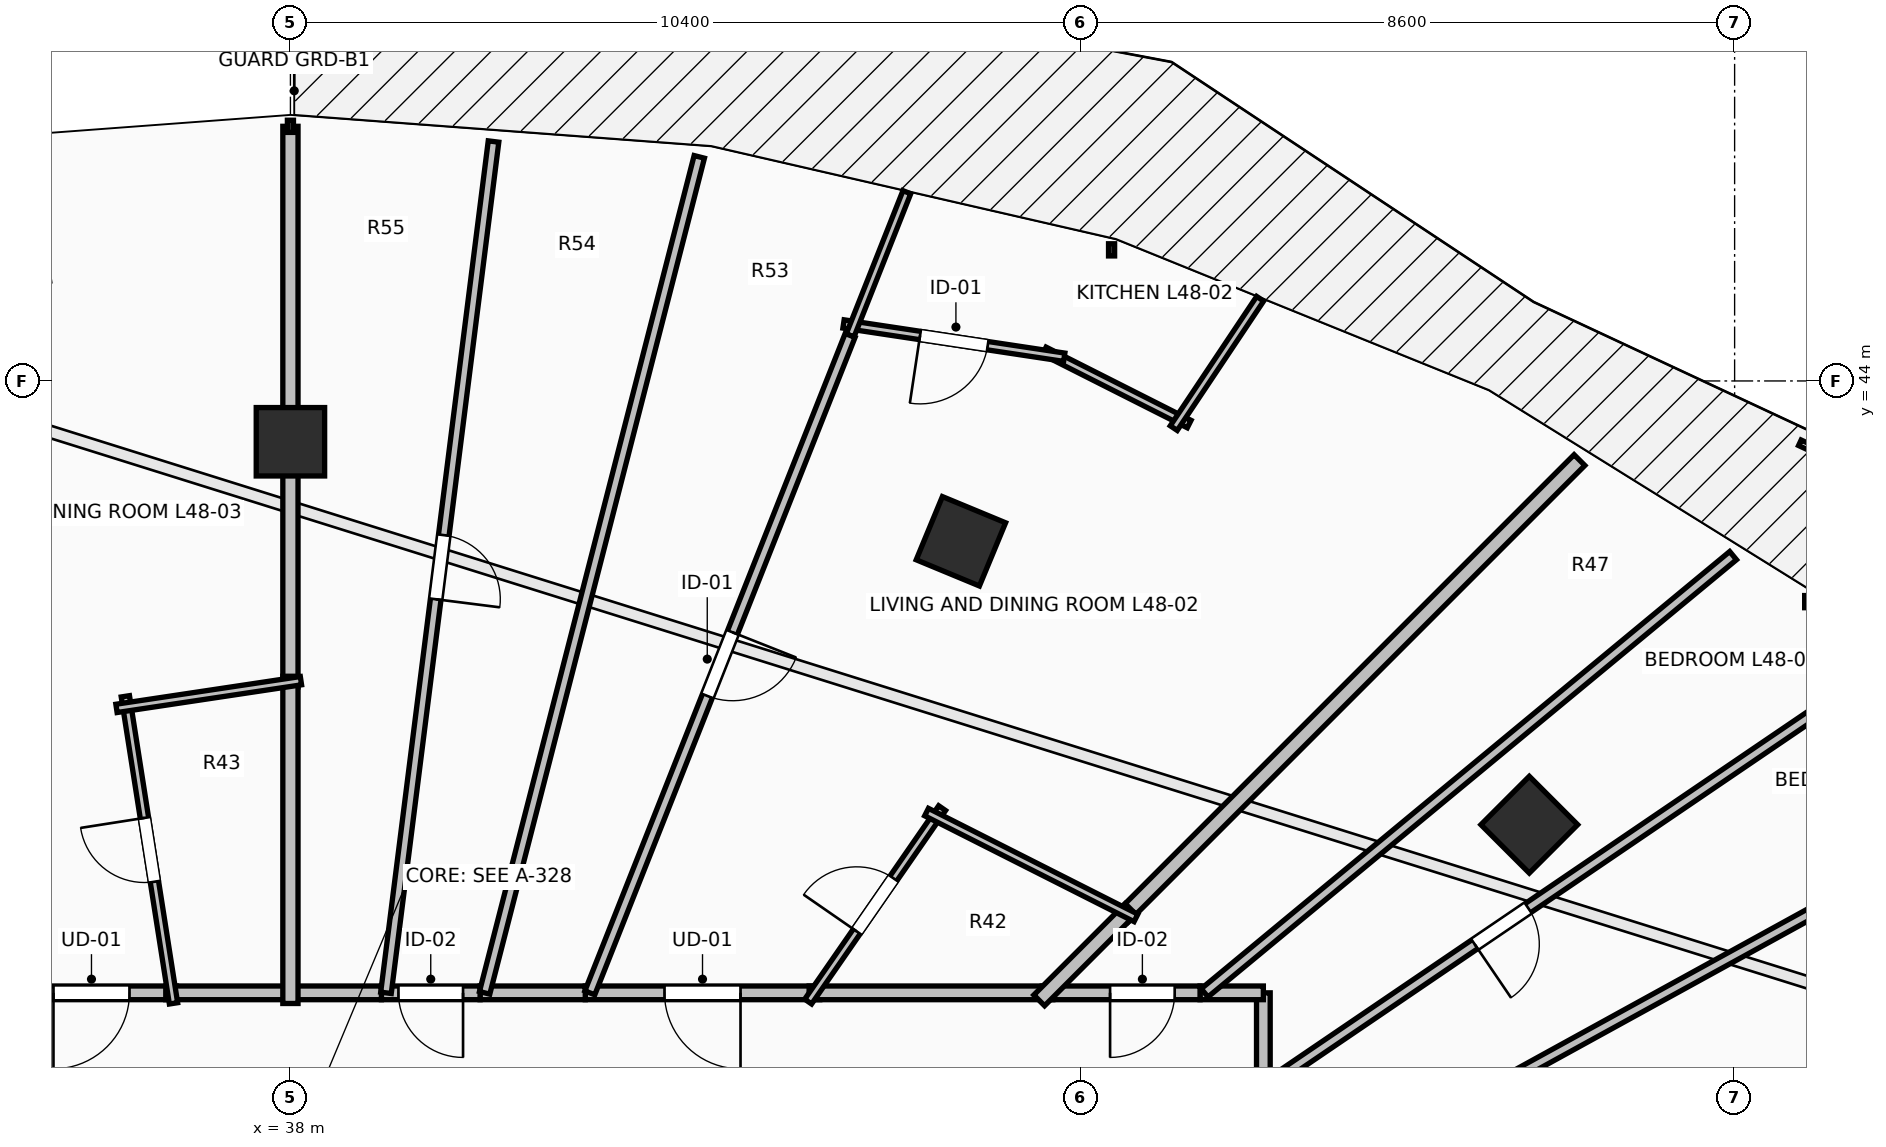
"""IFC4 building model, lengths in metres.
Left out: names, types, materials, properties, quantities, classifications, styles, units other than length and angle.
Written with IfcOpenShell. Run it as: python <this file> out.ifc"""

import sys

from ifc_helpers import new_model, si_unit, direction, frame, frame_2d, origin, origin_2d, place, context, subcontext, project, spatial, rectangle, extrude, element, fill, save


model = new_model("IFC4")
c1 = context("Model", 3, precision=1e-05, world=origin(), true_north=direction((0.0, 1.0)))
c2 = subcontext(c1, "Body", "Model", "MODEL_VIEW")
j1 = project(units=[si_unit("LENGTHUNIT", "METRE"), si_unit("PLANEANGLEUNIT", "RADIAN")], contexts=[c1])
p1 = place(None, origin())
s1 = spatial("IfcSite", under=j1, at=p1, CompositionType="ELEMENT")
p2 = place(p1, origin())
s2 = spatial("IfcBuilding", under=s1, at=p2, CompositionType="ELEMENT")
p3 = place(p2, frame((0.0, 0.0, 179.1)))
s3 = spatial("IfcBuildingStorey", under=s2, at=p3, CompositionType="ELEMENT", Elevation=179.1)
for number, where, z_axis, x_axis in (
    (1, (54.299, 38.162, 0.0), (0.0, 0.0, 1.0), (0.707, 0.707, 0.0)),
    (2, (46.821, 41.891, 0.0), (0.0, 0.0, 1.0), (0.383, 0.924, 0.0)),
    (3, (38.0, 43.2, 0.0), (0.0, 0.0, 1.0), (0.0, 1.0, 0.0)),
):
    element("IfcColumn", number, at=place(p3, frame(where, z_axis=z_axis, x_axis=x_axis)), inside=s3, PredefinedType="COLUMN", context=c2, shape_type="SweptSolid", body=[
        extrude(rectangle(XDim=0.9, YDim=0.9, at=origin_2d()), origin(), (0.0, 0.0, 1.0), 3.5),
    ])
p4 = place(p3, frame((50.8, 34.772, 0.0), z_axis=(0.0, 0.0, 1.0), x_axis=(0.0, 1.0, 0.0)))
e4 = element("IfcWall", 4, at=p4, inside=s3, PredefinedType="PARTITIONING", context=c2, shape_type="SweptSolid", body=[
    extrude(rectangle(XDim=1.178, YDim=0.18, at=frame_2d((0.589, 0.0))), origin(), (0.0, 0.0, 1.0), 2.432),
])
p5 = place(p3, frame((50.8, 35.95, 0.0), z_axis=(0.0, 0.0, 1.0), x_axis=(-1.0, 0.0, 0.0)))
e5 = element("IfcWall", 5, at=p5, inside=s3, PredefinedType="PARTITIONING", context=c2, shape_type="SweptSolid", body=[
    extrude(rectangle(XDim=0.833, YDim=0.18, at=frame_2d((0.417, 0.0))), origin(), (0.0, 0.0, 1.0), 3.24),
])
p6 = place(p3, frame((49.967, 35.95, 0.0), z_axis=(0.0, 0.0, 1.0), x_axis=(-1.0, 0.0, 0.0)))
e6 = element("IfcWall", 6, at=p6, inside=s3, PredefinedType="PARTITIONING", context=c2, shape_type="SweptSolid", body=[
    extrude(rectangle(XDim=2.077, YDim=0.18, at=frame_2d((1.039, 0.0))), origin(), (0.0, 0.0, 1.0), 2.432),
])
p7 = place(p6, frame((0.333, 0.0, 0.0)))
e7 = element("IfcOpeningElement", 7, at=p7, cuts=e6, PredefinedType="OPENING", context=c2, shape_type="SweptSolid", body=[
    extrude(rectangle(XDim=0.85, YDim=2.1, at=frame_2d((0.425, 1.05))), frame((0.0, 0.105, 0.0), z_axis=(0.0, -1.0, 0.0), x_axis=(1.0, 0.0, 0.0)), (0.0, 0.0, 1.0), 0.21),
])
p8 = place(p3, frame((44.964, 35.95, 0.0), z_axis=(0.0, 0.0, 1.0), x_axis=(-1.0, 0.0, 0.0)))
e8 = element("IfcWall", 8, at=p8, inside=s3, PredefinedType="PARTITIONING", context=c2, shape_type="SweptSolid", body=[
    extrude(rectangle(XDim=3.085, YDim=0.18, at=frame_2d((1.542, 0.0))), origin(), (0.0, 0.0, 1.0), 2.922),
])
p9 = place(p8, frame((1.042, 0.0, 0.0)))
e9 = element("IfcOpeningElement", 9, at=p9, cuts=e8, PredefinedType="OPENING", context=c2, shape_type="SweptSolid", body=[
    extrude(rectangle(XDim=1.0, YDim=2.15, at=frame_2d((0.5, 1.075))), frame((0.0, 0.105, 0.0), z_axis=(0.0, -1.0, 0.0), x_axis=(1.0, 0.0, 0.0)), (0.0, 0.0, 1.0), 0.21),
])
p10 = place(p3, frame((48.03, 35.95, 0.0), z_axis=(0.0, 0.0, 1.0), x_axis=(-1.0, 0.0, 0.0)))
e10 = element("IfcWall", 10, at=p10, inside=s3, PredefinedType="PARTITIONING", context=c2, shape_type="SweptSolid", body=[
    extrude(rectangle(XDim=3.206, YDim=0.18, at=frame_2d((1.603, 0.0))), origin(), (0.0, 0.0, 1.0), 2.432),
])
p11 = place(p3, frame((41.879, 35.95, 0.0), z_axis=(0.0, 0.0, 1.0), x_axis=(-1.0, 0.0, 0.0)))
e11 = element("IfcWall", 11, at=p11, inside=s3, PredefinedType="PARTITIONING", context=c2, shape_type="SweptSolid", body=[
    extrude(rectangle(XDim=1.384, YDim=0.18, at=frame_2d((0.692, 0.0))), origin(), (0.0, 0.0, 1.0), 2.922),
])
p12 = place(p3, frame((40.495, 35.95, 0.0), z_axis=(0.0, 0.0, 1.0), x_axis=(-1.0, 0.0, 0.0)))
e12 = element("IfcWall", 12, at=p12, inside=s3, PredefinedType="PARTITIONING", context=c2, shape_type="SweptSolid", body=[
    extrude(rectangle(XDim=1.298, YDim=0.18, at=frame_2d((0.649, 0.0))), origin(), (0.0, 0.0, 1.0), 2.922),
])
p13 = place(p12, frame((0.224, 0.0, 0.0)))
e13 = element("IfcOpeningElement", 13, at=p13, cuts=e12, PredefinedType="OPENING", context=c2, shape_type="SweptSolid", body=[
    extrude(rectangle(XDim=0.85, YDim=2.1, at=frame_2d((0.425, 1.05))), frame((0.0, 0.105, 0.0), z_axis=(0.0, -1.0, 0.0), x_axis=(1.0, 0.0, 0.0)), (0.0, 0.0, 1.0), 0.21),
])
p14 = place(p3, frame((39.197, 35.95, 0.0), z_axis=(0.0, 0.0, 1.0), x_axis=(-1.0, 0.0, 0.0)))
e14 = element("IfcWall", 14, at=p14, inside=s3, PredefinedType="PARTITIONING", context=c2, shape_type="SweptSolid", body=[
    extrude(rectangle(XDim=1.257, YDim=0.18, at=frame_2d((0.628, 0.0))), origin(), (0.0, 0.0, 1.0), 2.922),
])
p15 = place(p3, frame((36.5, 35.95, 0.0), z_axis=(0.0, 0.0, 1.0), x_axis=(-1.0, 0.0, 0.0)))
e15 = element("IfcWall", 15, at=p15, inside=s3, PredefinedType="PARTITIONING", context=c2, shape_type="SweptSolid", body=[
    extrude(rectangle(XDim=2.235, YDim=0.18, at=frame_2d((1.118, 0.0))), origin(), (0.0, 0.0, 1.0), 2.922),
])
p16 = place(p15, frame((0.617, 0.0, 0.0)))
e16 = element("IfcOpeningElement", 16, at=p16, cuts=e15, PredefinedType="OPENING", context=c2, shape_type="SweptSolid", body=[
    extrude(rectangle(XDim=1.0, YDim=2.15, at=frame_2d((0.5, 1.075))), frame((0.0, 0.105, 0.0), z_axis=(0.0, -1.0, 0.0), x_axis=(1.0, 0.0, 0.0)), (0.0, 0.0, 1.0), 0.21),
])
p17 = place(p3, frame((38.08, 35.95, 0.0), z_axis=(0.0, 0.0, 1.0), x_axis=(-1.0, 0.0, 0.0)))
e17 = element("IfcWall", 17, at=p17, inside=s3, PredefinedType="PARTITIONING", context=c2, shape_type="SweptSolid", body=[
    extrude(rectangle(XDim=1.72, YDim=0.18, at=frame_2d((0.86, 0.0))), origin(), (0.0, 0.0, 1.0), 2.922),
])
p18 = place(p3, frame((60.761, 38.513, 0.0), z_axis=(0.0, 0.0, 1.0), x_axis=(-0.876315654865, -0.481737348602, 0.0)))
e18 = element("IfcWall", 18, at=p18, inside=s3, PredefinedType="PARTITIONING", context=c2, shape_type="SweptSolid", body=[
    extrude(rectangle(XDim=11.367, YDim=0.14, at=frame_2d((5.684, 0.0))), origin(), (0.0, 0.0, 1.0), 2.432),
])
p19 = place(p3, frame((58.917, 40.215, 0.0), z_axis=(0.0, 0.0, 1.0), x_axis=(-0.827087951184, -0.562072522906, 0.0)))
e19 = element("IfcWall", 19, at=p19, inside=s3, PredefinedType="PARTITIONING", context=c2, shape_type="SweptSolid", body=[
    extrude(rectangle(XDim=9.814, YDim=0.14, at=frame_2d((4.907, 0.0))), origin(), (0.0, 0.0, 1.0), 2.432),
])
p20 = place(p19, frame((5.602, 0.0, 0.0)))
e20 = element("IfcOpeningElement", 20, at=p20, cuts=e19, PredefinedType="OPENING", context=c2, shape_type="SweptSolid", body=[
    extrude(rectangle(XDim=0.85, YDim=2.1, at=frame_2d((0.425, 1.05))), frame((0.0, 0.085, 0.0), z_axis=(0.0, -1.0, 0.0), x_axis=(1.0, 0.0, 0.0)), (0.0, 0.0, 1.0), 0.17),
])
p21 = place(p3, frame((56.98, 41.702, 0.0), z_axis=(0.0, 0.0, 1.0), x_axis=(-0.770511618294, -0.637425953405, 0.0)))
e21 = element("IfcWall", 21, at=p21, inside=s3, PredefinedType="PARTITIONING", context=c2, shape_type="SweptSolid", body=[
    extrude(rectangle(XDim=9.024, YDim=0.14, at=frame_2d((4.512, 0.0))), origin(), (0.0, 0.0, 1.0), 2.774),
])
p22 = place(p3, frame((54.959, 42.959, 0.0), z_axis=(0.0, 0.0, 1.0), x_axis=(-0.707106781187, -0.707106781187, 0.0)))
e22 = element("IfcWall", 22, at=p22, inside=s3, PredefinedType="PARTITIONING", context=c2, shape_type="SweptSolid", body=[
    extrude(rectangle(XDim=8.492, YDim=0.2, at=frame_2d((4.246, 0.0))), origin(), (0.0, 0.0, 1.0), 2.774),
])
p23 = place(p3, frame((49.053, 37.053, 0.0), z_axis=(0.0, 0.0, 1.0), x_axis=(-0.707106781187, -0.707106781187, 0.0)))
e23 = element("IfcWall", 23, at=p23, inside=s3, PredefinedType="PARTITIONING", context=c2, shape_type="SweptSolid", body=[
    extrude(rectangle(XDim=1.7, YDim=0.2, at=frame_2d((0.85, 0.0))), origin(), (0.0, 0.0, 1.0), 2.432),
])
p24 = place(p3, frame((44.811, 35.835, 0.0), z_axis=(0.0, 0.0, 1.0), x_axis=(0.569300192805, 0.822129728493, 0.0)))
e24 = element("IfcWall", 24, at=p24, inside=s3, PredefinedType="PARTITIONING", context=c2, shape_type="SweptSolid", body=[
    extrude(rectangle(XDim=3.096, YDim=0.11, at=frame_2d((1.548, 0.0))), origin(), (0.0, 0.0, 1.0), 2.922),
])
p25 = place(p24, frame((1.123, 0.0, 0.0)))
e25 = element("IfcOpeningElement", 25, at=p25, cuts=e24, PredefinedType="OPENING", context=c2, shape_type="SweptSolid", body=[
    extrude(rectangle(XDim=0.85, YDim=2.1, at=frame_2d((0.425, 1.05))), frame((0.0, 0.07, 0.0), z_axis=(0.0, -1.0, 0.0), x_axis=(1.0, 0.0, 0.0)), (0.0, 0.0, 1.0), 0.14),
])
p26 = place(p3, frame((46.369, 38.328, 0.0), z_axis=(0.0, 0.0, 1.0), x_axis=(0.892472891666, -0.451101028199, 0.0)))
e26 = element("IfcWall", 26, at=p26, inside=s3, PredefinedType="PARTITIONING", context=c2, shape_type="SweptSolid", body=[
    extrude(rectangle(XDim=3.086, YDim=0.11, at=frame_2d((1.543, 0.0))), origin(), (0.0, 0.0, 1.0), 2.432),
])
p27 = place(p3, frame((49.824, 43.433, 0.0), z_axis=(0.0, 0.0, 1.0), x_axis=(-0.892614331311, 0.450821090388, 0.0)))
e27 = element("IfcWall", 27, at=p27, inside=s3, PredefinedType="PARTITIONING", context=c2, shape_type="SweptSolid", body=[
    extrude(rectangle(XDim=2.136, YDim=0.11, at=frame_2d((1.068, 0.0))), origin(), (0.0, 0.0, 1.0), 3.24),
])
p28 = place(p3, frame((48.18, 44.312, 0.0), z_axis=(0.0, 0.0, 1.0), x_axis=(-0.988815285508, 0.149145335648, 0.0)))
e28 = element("IfcWall", 28, at=p28, inside=s3, PredefinedType="PARTITIONING", context=c2, shape_type="SweptSolid", body=[
    extrude(rectangle(XDim=2.937, YDim=0.11, at=frame_2d((1.468, 0.0))), origin(), (0.0, 0.0, 1.0), 3.24),
])
p29 = place(p28, frame((1.018, 0.0, 0.0)))
e29 = element("IfcOpeningElement", 29, at=p29, cuts=e28, PredefinedType="OPENING", context=c2, shape_type="SweptSolid", body=[
    extrude(rectangle(XDim=0.9, YDim=2.1, at=frame_2d((0.45, 1.05))), frame((0.0, 0.07, 0.0), z_axis=(0.0, -1.0, 0.0), x_axis=(1.0, 0.0, 0.0)), (0.0, 0.0, 1.0), 0.14),
])
p30 = place(p3, frame((45.364, 44.599, 0.0), z_axis=(0.0, 0.0, 1.0), x_axis=(0.368148258243, 0.929767099844, 0.0)))
e30 = element("IfcWall", 30, at=p30, inside=s3, PredefinedType="PARTITIONING", context=c2, shape_type="SweptSolid", body=[
    extrude(rectangle(XDim=2.027, YDim=0.11, at=frame_2d((1.013, 0.0))), origin(), (0.0, 0.0, 1.0), 3.24),
])
p31 = place(p3, frame((50.758, 45.081, 0.0), z_axis=(0.0, 0.0, 1.0), x_axis=(-0.55538833369, -0.831591124773, 0.0)))
e31 = element("IfcWall", 31, at=p31, inside=s3, PredefinedType="PARTITIONING", context=c2, shape_type="SweptSolid", body=[
    extrude(rectangle(XDim=2.046, YDim=0.11, at=frame_2d((1.023, 0.0))), origin(), (0.0, 0.0, 1.0), 3.24),
])
p32 = place(p3, frame((45.363, 44.599, 0.0), z_axis=(0.0, 0.0, 1.0), x_axis=(-0.368121248273, -0.929777794191, 0.0)))
e32 = element("IfcWall", 32, at=p32, inside=s3, PredefinedType="PARTITIONING", context=c2, shape_type="SweptSolid", body=[
    extrude(rectangle(XDim=9.302, YDim=0.14, at=frame_2d((4.651, 0.0))), origin(), (0.0, 0.0, 1.0), 2.774),
])
p33 = place(p32, frame((4.201, 0.0, 0.0)))
e33 = element("IfcOpeningElement", 33, at=p33, cuts=e32, PredefinedType="OPENING", context=c2, shape_type="SweptSolid", body=[
    extrude(rectangle(XDim=0.9, YDim=2.1, at=frame_2d((0.45, 1.05))), frame((0.0, 0.085, 0.0), z_axis=(0.0, -1.0, 0.0), x_axis=(1.0, 0.0, 0.0)), (0.0, 0.0, 1.0), 0.17),
])
p34 = place(p3, frame((43.379, 46.948, 0.0), z_axis=(0.0, 0.0, 1.0), x_axis=(-0.248702786244, -0.968579849116, 0.0)))
e34 = element("IfcWall", 34, at=p34, inside=s3, PredefinedType="PARTITIONING", context=c2, shape_type="SweptSolid", body=[
    extrude(rectangle(XDim=11.355, YDim=0.14, at=frame_2d((5.677, 0.0))), origin(), (0.0, 0.0, 1.0), 2.774),
])
p35 = place(p3, frame((40.672, 47.15, 0.0), z_axis=(0.0, 0.0, 1.0), x_axis=(-0.125346852027, -0.992112980808, 0.0)))
e35 = element("IfcWall", 35, at=p35, inside=s3, PredefinedType="PARTITIONING", context=c2, shape_type="SweptSolid", body=[
    extrude(rectangle(XDim=11.289, YDim=0.14, at=frame_2d((5.645, 0.0))), origin(), (0.0, 0.0, 1.0), 2.774),
])
p36 = place(p35, frame((5.219, 0.0, 0.0)))
e36 = element("IfcOpeningElement", 36, at=p36, cuts=e35, PredefinedType="OPENING", context=c2, shape_type="SweptSolid", body=[
    extrude(rectangle(XDim=0.85, YDim=2.1, at=frame_2d((0.425, 1.05))), frame((0.0, 0.085, 0.0), z_axis=(0.0, -1.0, 0.0), x_axis=(1.0, 0.0, 0.0)), (0.0, 0.0, 1.0), 0.17),
])
p37 = place(p3, frame((38.0, 47.35, 0.0), z_axis=(0.0, 0.0, 1.0), x_axis=(0.0, -1.0, 0.0)))
e37 = element("IfcWall", 37, at=p37, inside=s3, PredefinedType="PARTITIONING", context=c2, shape_type="SweptSolid", body=[
    extrude(rectangle(XDim=7.375, YDim=0.2, at=frame_2d((3.688, 0.0))), origin(), (0.0, 0.0, 1.0), 3.24),
])
p38 = place(p3, frame((38.0, 40.115, 0.0), z_axis=(0.0, 0.0, 1.0), x_axis=(0.0, -1.0, 0.0)))
e38 = element("IfcWall", 38, at=p38, inside=s3, PredefinedType="PARTITIONING", context=c2, shape_type="SweptSolid", body=[
    extrude(rectangle(XDim=4.305, YDim=0.2, at=frame_2d((2.152, 0.0))), origin(), (0.0, 0.0, 1.0), 2.874),
])
p39 = place(p3, frame((36.462, 35.812, 0.0), z_axis=(0.0, 0.0, 1.0), x_axis=(-0.154883213323, 0.987932786292, 0.0)))
e39 = element("IfcWall", 39, at=p39, inside=s3, PredefinedType="PARTITIONING", context=c2, shape_type="SweptSolid", body=[
    extrude(rectangle(XDim=4.089, YDim=0.11, at=frame_2d((2.044, 0.0))), origin(), (0.0, 0.0, 1.0), 2.874),
])
p40 = place(p39, frame((1.619, 0.0, 0.0)))
e40 = element("IfcOpeningElement", 40, at=p40, cuts=e39, PredefinedType="OPENING", context=c2, shape_type="SweptSolid", body=[
    extrude(rectangle(XDim=0.85, YDim=2.1, at=frame_2d((0.425, 1.05))), frame((0.0, 0.07, 0.0), z_axis=(0.0, -1.0, 0.0), x_axis=(1.0, 0.0, 0.0)), (0.0, 0.0, 1.0), 0.14),
])
p41 = place(p3, frame((35.712, 39.692, 0.0), z_axis=(0.0, 0.0, 1.0), x_axis=(0.988892526147, 0.148632337431, 0.0)))
e41 = element("IfcWall", 41, at=p41, inside=s3, PredefinedType="PARTITIONING", context=c2, shape_type="SweptSolid", body=[
    extrude(rectangle(XDim=2.454, YDim=0.11, at=frame_2d((1.227, 0.0))), origin(), (0.0, 0.0, 1.0), 3.24),
])
p42 = place(p9, origin())
e42 = element("IfcDoor", 42, at=p42, inside=s3, OperationType="SINGLE_SWING_LEFT", PredefinedType="DOOR", context=c2, shape_type="SweptSolid", body=[
    extrude(rectangle(XDim=1.0, YDim=2.15, at=frame_2d((0.5, 1.075))), frame((0.0, 0.025, 0.0), z_axis=(0.0, -1.0, 0.0), x_axis=(1.0, 0.0, 0.0)), (0.0, 0.0, 1.0), 0.05),
])
fill(e9, e42)
p43 = place(p16, origin())
e43 = element("IfcDoor", 43, at=p43, inside=s3, OperationType="SINGLE_SWING_RIGHT", PredefinedType="DOOR", context=c2, shape_type="SweptSolid", body=[
    extrude(rectangle(XDim=1.0, YDim=2.15, at=frame_2d((0.5, 1.075))), frame((0.0, 0.025, 0.0), z_axis=(0.0, -1.0, 0.0), x_axis=(1.0, 0.0, 0.0)), (0.0, 0.0, 1.0), 0.05),
])
fill(e16, e43)
p44 = place(p25, origin())
e44 = element("IfcDoor", 44, at=p44, inside=s3, OperationType="SINGLE_SWING_LEFT", PredefinedType="DOOR", context=c2, shape_type="SweptSolid", body=[
    extrude(rectangle(XDim=0.85, YDim=2.1, at=frame_2d((0.425, 1.05))), frame((0.0, 0.025, 0.0), z_axis=(0.0, -1.0, 0.0), x_axis=(1.0, 0.0, 0.0)), (0.0, 0.0, 1.0), 0.05),
])
fill(e25, e44)
p45 = place(p29, origin())
e45 = element("IfcDoor", 45, at=p45, inside=s3, OperationType="SINGLE_SWING_RIGHT", PredefinedType="DOOR", context=c2, shape_type="SweptSolid", body=[
    extrude(rectangle(XDim=0.9, YDim=2.1, at=frame_2d((0.45, 1.05))), frame((0.0, 0.025, 0.0), z_axis=(0.0, -1.0, 0.0), x_axis=(1.0, 0.0, 0.0)), (0.0, 0.0, 1.0), 0.05),
])
fill(e29, e45)
p46 = place(p33, origin())
e46 = element("IfcDoor", 46, at=p46, inside=s3, OperationType="SINGLE_SWING_LEFT", PredefinedType="DOOR", context=c2, shape_type="SweptSolid", body=[
    extrude(rectangle(XDim=0.9, YDim=2.1, at=frame_2d((0.45, 1.05))), frame((0.0, 0.025, 0.0), z_axis=(0.0, -1.0, 0.0), x_axis=(1.0, 0.0, 0.0)), (0.0, 0.0, 1.0), 0.05),
])
fill(e33, e46)
p47 = place(p40, origin())
e47 = element("IfcDoor", 47, at=p47, inside=s3, OperationType="SINGLE_SWING_RIGHT", PredefinedType="DOOR", context=c2, shape_type="SweptSolid", body=[
    extrude(rectangle(XDim=0.85, YDim=2.1, at=frame_2d((0.425, 1.05))), frame((0.0, 0.025, 0.0), z_axis=(0.0, -1.0, 0.0), x_axis=(1.0, 0.0, 0.0)), (0.0, 0.0, 1.0), 0.05),
])
fill(e40, e47)
p48 = place(p7, origin())
e48 = element("IfcDoor", 48, at=p48, inside=s3, OperationType="SINGLE_SWING_RIGHT", PredefinedType="DOOR", context=c2, shape_type="SweptSolid", body=[
    extrude(rectangle(XDim=0.85, YDim=2.1, at=frame_2d((0.425, 1.05))), frame((0.0, 0.025, 0.0), z_axis=(0.0, -1.0, 0.0), x_axis=(1.0, 0.0, 0.0)), (0.0, 0.0, 1.0), 0.05),
])
fill(e7, e48)
p49 = place(p13, origin())
e49 = element("IfcDoor", 49, at=p49, inside=s3, OperationType="SINGLE_SWING_LEFT", PredefinedType="DOOR", context=c2, shape_type="SweptSolid", body=[
    extrude(rectangle(XDim=0.85, YDim=2.1, at=frame_2d((0.425, 1.05))), frame((0.0, 0.025, 0.0), z_axis=(0.0, -1.0, 0.0), x_axis=(1.0, 0.0, 0.0)), (0.0, 0.0, 1.0), 0.05),
])
fill(e13, e49)
p50 = place(p20, origin())
e50 = element("IfcDoor", 50, at=p50, inside=s3, OperationType="SINGLE_SWING_RIGHT", PredefinedType="DOOR", context=c2, shape_type="SweptSolid", body=[
    extrude(rectangle(XDim=0.85, YDim=2.1, at=frame_2d((0.425, 1.05))), frame((0.0, 0.025, 0.0), z_axis=(0.0, -1.0, 0.0), x_axis=(1.0, 0.0, 0.0)), (0.0, 0.0, 1.0), 0.05),
])
fill(e20, e50)
p51 = place(p36, origin())
e51 = element("IfcDoor", 51, at=p51, inside=s3, OperationType="SINGLE_SWING_RIGHT", PredefinedType="DOOR", context=c2, shape_type="SweptSolid", body=[
    extrude(rectangle(XDim=0.85, YDim=2.1, at=frame_2d((0.425, 1.05))), frame((0.0, 0.025, 0.0), z_axis=(0.0, -1.0, 0.0), x_axis=(1.0, 0.0, 0.0)), (0.0, 0.0, 1.0), 0.05),
])
fill(e36, e51)
save(model, sys.argv[1])
